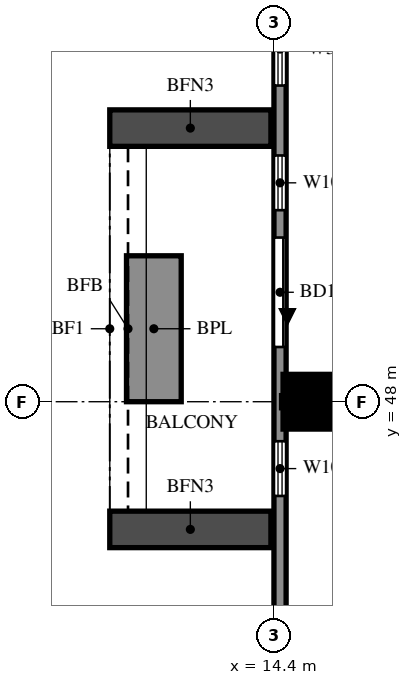
"""IFC4 building model, lengths in metres.
Left out: names, types, materials, properties, quantities, classifications, styles, units other than length and angle.
Written with IfcOpenShell. Run it as: python <this file> out.ifc"""

import sys

from ifc_helpers import new_model, si_unit, direction, frame, frame_2d, origin, origin_2d, place, context, subcontext, project, spatial, rectangle, extrude, source, transform, mapped, element, fill, save


model = new_model("IFC4")
c1 = context("Model", 3, precision=1e-05, world=origin(), true_north=direction((0.0, 1.0)))
c2 = subcontext(c1, "Body", "Model", "MODEL_VIEW")
j1 = project(units=[si_unit("LENGTHUNIT", "METRE"), si_unit("PLANEANGLEUNIT", "RADIAN")], contexts=[c1])
p1 = place(None, origin())
s1 = spatial("IfcSite", under=j1, at=p1, CompositionType="ELEMENT")
p2 = place(p1, origin())
s2 = spatial("IfcBuilding", under=s1, at=p2, CompositionType="ELEMENT")
p3 = place(p2, frame((0.0, 0.0, 97.0)))
s3 = spatial("IfcBuildingStorey", under=s2, at=p3, CompositionType="ELEMENT", Elevation=97.0)
m1 = source(origin(), c2, "Body", "SweptSolid", [
    extrude(rectangle(XDim=0.9, YDim=0.9, at=origin_2d()), origin(), (0.0, 0.0, 1.0), 3.18),
])
p4 = place(p3, frame((15.0, 48.0, 0.0), z_axis=(0.0, 0.0, 1.0), x_axis=(1.0, 0.0, 0.0)))
e1 = element("IfcColumn", 1, at=p4, inside=s3, PredefinedType="COLUMN", context=c2, shape_type="MappedRepresentation", body=[
    mapped(m1, transform((0.0, 0.0, 0.0))),
])
p5 = place(p3, frame((14.5, 76.6, 0.0), z_axis=(0.0, 0.0, 1.0), x_axis=(0.0, -1.0, 0.0)))
e2 = element("IfcWall", 2, at=p5, inside=s3, PredefinedType="SOLIDWALL", context=c2, shape_type="SweptSolid", body=[
    extrude(rectangle(XDim=39.4, YDim=0.2, at=frame_2d((19.7, 0.0))), origin(), (0.0, 0.0, 1.0), 3.18),
])
p6 = place(p5, frame((25.9, 0.0, 0.0)))
e3 = element("IfcOpeningElement", 3, at=p6, cuts=e2, PredefinedType="OPENING", context=c2, shape_type="SweptSolid", body=[
    extrude(rectangle(XDim=1.8, YDim=2.4, at=frame_2d((0.9, 1.2))), frame((0.0, 0.11, 0.0), z_axis=(0.0, -1.0, 0.0), x_axis=(1.0, 0.0, 0.0)), (0.0, 0.0, 1.0), 0.22),
])
p7 = place(p5, frame((29.25, 0.0, 0.6)))
e4 = element("IfcOpeningElement", 4, at=p7, cuts=e2, PredefinedType="OPENING", context=c2, shape_type="SweptSolid", body=[
    extrude(rectangle(XDim=0.9, YDim=2.4, at=frame_2d((0.45, 1.2))), frame((0.0, 0.11, 0.0), z_axis=(0.0, -1.0, 0.0), x_axis=(1.0, 0.0, 0.0)), (0.0, 0.0, 1.0), 0.22),
])
p8 = place(p5, frame((32.0, 0.0, 0.6)))
e5 = element("IfcOpeningElement", 5, at=p8, cuts=e2, PredefinedType="OPENING", context=c2, shape_type="SweptSolid", body=[
    extrude(rectangle(XDim=2.4, YDim=2.4, at=frame_2d((1.2, 1.2))), frame((0.0, 0.11, 0.0), z_axis=(0.0, -1.0, 0.0), x_axis=(1.0, 0.0, 0.0)), (0.0, 0.0, 1.0), 0.22),
])
p9 = place(p5, frame((36.8, 0.0, 0.6)))
e6 = element("IfcOpeningElement", 6, at=p9, cuts=e2, PredefinedType="OPENING", context=c2, shape_type="SweptSolid", body=[
    extrude(rectangle(XDim=1.8, YDim=2.4, at=frame_2d((0.9, 1.2))), frame((0.0, 0.11, 0.0), z_axis=(0.0, -1.0, 0.0), x_axis=(1.0, 0.0, 0.0)), (0.0, 0.0, 1.0), 0.22),
])
p10 = place(p5, frame((22.2, 0.0, 0.6)))
e7 = element("IfcOpeningElement", 7, at=p10, cuts=e2, PredefinedType="OPENING", context=c2, shape_type="SweptSolid", body=[
    extrude(rectangle(XDim=1.2, YDim=2.4, at=frame_2d((0.6, 1.2))), frame((0.0, 0.11, 0.0), z_axis=(0.0, -1.0, 0.0), x_axis=(1.0, 0.0, 0.0)), (0.0, 0.0, 1.0), 0.22),
])
p11 = place(p5, frame((24.55, 0.0, 0.6)))
e8 = element("IfcOpeningElement", 8, at=p11, cuts=e2, PredefinedType="OPENING", context=c2, shape_type="SweptSolid", body=[
    extrude(rectangle(XDim=0.9, YDim=2.4, at=frame_2d((0.45, 1.2))), frame((0.0, 0.11, 0.0), z_axis=(0.0, -1.0, 0.0), x_axis=(1.0, 0.0, 0.0)), (0.0, 0.0, 1.0), 0.22),
])
p12 = place(p5, frame((18.2, 0.0, 0.6)))
e9 = element("IfcOpeningElement", 9, at=p12, cuts=e2, PredefinedType="OPENING", context=c2, shape_type="SweptSolid", body=[
    extrude(rectangle(XDim=2.4, YDim=2.4, at=frame_2d((1.2, 1.2))), frame((0.0, 0.11, 0.0), z_axis=(0.0, -1.0, 0.0), x_axis=(1.0, 0.0, 0.0)), (0.0, 0.0, 1.0), 0.22),
])
p13 = place(p5, frame((15.3, 0.0, 0.6)))
e10 = element("IfcOpeningElement", 10, at=p13, cuts=e2, PredefinedType="OPENING", context=c2, shape_type="SweptSolid", body=[
    extrude(rectangle(XDim=1.8, YDim=2.4, at=frame_2d((0.9, 1.2))), frame((0.0, 0.11, 0.0), z_axis=(0.0, -1.0, 0.0), x_axis=(1.0, 0.0, 0.0)), (0.0, 0.0, 1.0), 0.22),
])
p14 = place(p5, frame((11.75, 0.0, 1.5)))
e11 = element("IfcOpeningElement", 11, at=p14, cuts=e2, PredefinedType="OPENING", context=c2, shape_type="SweptSolid", body=[
    extrude(rectangle(XDim=0.9, YDim=0.9, at=frame_2d((0.45, 0.45))), frame((0.0, 0.11, 0.0), z_axis=(0.0, -1.0, 0.0), x_axis=(1.0, 0.0, 0.0)), (0.0, 0.0, 1.0), 0.22),
])
p15 = place(p5, frame((7.8, 0.0, 0.6)))
e12 = element("IfcOpeningElement", 12, at=p15, cuts=e2, PredefinedType="OPENING", context=c2, shape_type="SweptSolid", body=[
    extrude(rectangle(XDim=2.4, YDim=2.4, at=frame_2d((1.2, 1.2))), frame((0.0, 0.11, 0.0), z_axis=(0.0, -1.0, 0.0), x_axis=(1.0, 0.0, 0.0)), (0.0, 0.0, 1.0), 0.22),
])
p16 = place(p5, frame((3.8, 0.0, 0.6)))
e13 = element("IfcOpeningElement", 13, at=p16, cuts=e2, PredefinedType="OPENING", context=c2, shape_type="SweptSolid", body=[
    extrude(rectangle(XDim=2.4, YDim=2.4, at=frame_2d((1.2, 1.2))), frame((0.0, 0.11, 0.0), z_axis=(0.0, -1.0, 0.0), x_axis=(1.0, 0.0, 0.0)), (0.0, 0.0, 1.0), 0.22),
])
p17 = place(p5, frame((0.6, 0.0, 0.6)))
e14 = element("IfcOpeningElement", 14, at=p17, cuts=e2, PredefinedType="OPENING", context=c2, shape_type="SweptSolid", body=[
    extrude(rectangle(XDim=2.4, YDim=2.4, at=frame_2d((1.2, 1.2))), frame((0.0, 0.11, 0.0), z_axis=(0.0, -1.0, 0.0), x_axis=(1.0, 0.0, 0.0)), (0.0, 0.0, 1.0), 0.22),
])
for number, where, z_axis, x_axis in (
    (15, (14.35, 52.5, 0.0), (0.0, 0.0, 1.0), (-1.0, 0.0, 0.0)),
    (16, (14.35, 45.9, 0.0), (0.0, 0.0, 1.0), (-1.0, 0.0, 0.0)),
):
    element("IfcWall", number, at=place(p3, frame(where, z_axis=z_axis, x_axis=x_axis)), inside=s3, PredefinedType="SOLIDWALL", context=c2, shape_type="SweptSolid", body=[
        extrude(rectangle(XDim=2.65, YDim=0.6, at=frame_2d((1.325, 0.0))), origin(), (0.0, 0.0, 1.0), 2.85),
    ])
p18 = place(p3, frame((12.425, 50.4, 0.0), z_axis=(0.0, 0.0, 1.0), x_axis=(0.0, -1.0, 0.0)))
e17 = element("IfcWall", 17, at=p18, inside=s3, PredefinedType="SOLIDWALL", context=c2, shape_type="SweptSolid", body=[
    extrude(rectangle(XDim=2.4, YDim=0.9, at=frame_2d((1.2, 0.0))), origin(), (0.0, 0.0, 1.0), 0.9),
])
p19 = place(p3, frame((14.525, 48.0, 0.0), z_axis=(0.0, 0.0, 1.0), x_axis=(1.0, 0.0, 0.0)))
e18 = element("IfcWall", 18, at=p19, inside=s3, PredefinedType="SOLIDWALL", context=c2, shape_type="SweptSolid", body=[
    extrude(rectangle(XDim=19.075, YDim=0.2, at=frame_2d((9.538, 0.0))), origin(), (0.0, 0.0, 1.0), 3.18),
])
p20 = place(p6, origin())
e19 = element("IfcDoor", 19, at=p20, inside=s3, OperationType="DOUBLE_DOOR_SLIDING", PredefinedType="DOOR", context=c2, shape_type="SweptSolid", body=[
    extrude(rectangle(XDim=1.8, YDim=2.4, at=frame_2d((0.9, 1.2))), frame((0.0, 0.025, 0.0), z_axis=(0.0, -1.0, 0.0), x_axis=(1.0, 0.0, 0.0)), (0.0, 0.0, 1.0), 0.05),
])
fill(e3, e19)
p21 = place(p7, origin())
e20 = element("IfcWindow", 20, at=p21, inside=s3, PartitioningType="SINGLE_PANEL", PredefinedType="WINDOW", context=c2, shape_type="SweptSolid", body=[
    extrude(rectangle(XDim=0.9, YDim=2.4, at=frame_2d((0.45, 1.2))), frame((0.0, 0.03, 0.0), z_axis=(0.0, -1.0, 0.0), x_axis=(1.0, 0.0, 0.0)), (0.0, 0.0, 1.0), 0.06),
])
fill(e4, e20)
p22 = place(p10, origin())
e21 = element("IfcWindow", 21, at=p22, inside=s3, PartitioningType="SINGLE_PANEL", PredefinedType="WINDOW", context=c2, shape_type="SweptSolid", body=[
    extrude(rectangle(XDim=1.2, YDim=2.4, at=frame_2d((0.6, 1.2))), frame((0.0, 0.03, 0.0), z_axis=(0.0, -1.0, 0.0), x_axis=(1.0, 0.0, 0.0)), (0.0, 0.0, 1.0), 0.06),
])
fill(e7, e21)
p23 = place(p11, origin())
e22 = element("IfcWindow", 22, at=p23, inside=s3, PartitioningType="SINGLE_PANEL", PredefinedType="WINDOW", context=c2, shape_type="SweptSolid", body=[
    extrude(rectangle(XDim=0.9, YDim=2.4, at=frame_2d((0.45, 1.2))), frame((0.0, 0.03, 0.0), z_axis=(0.0, -1.0, 0.0), x_axis=(1.0, 0.0, 0.0)), (0.0, 0.0, 1.0), 0.06),
])
fill(e8, e22)
save(model, sys.argv[1])
